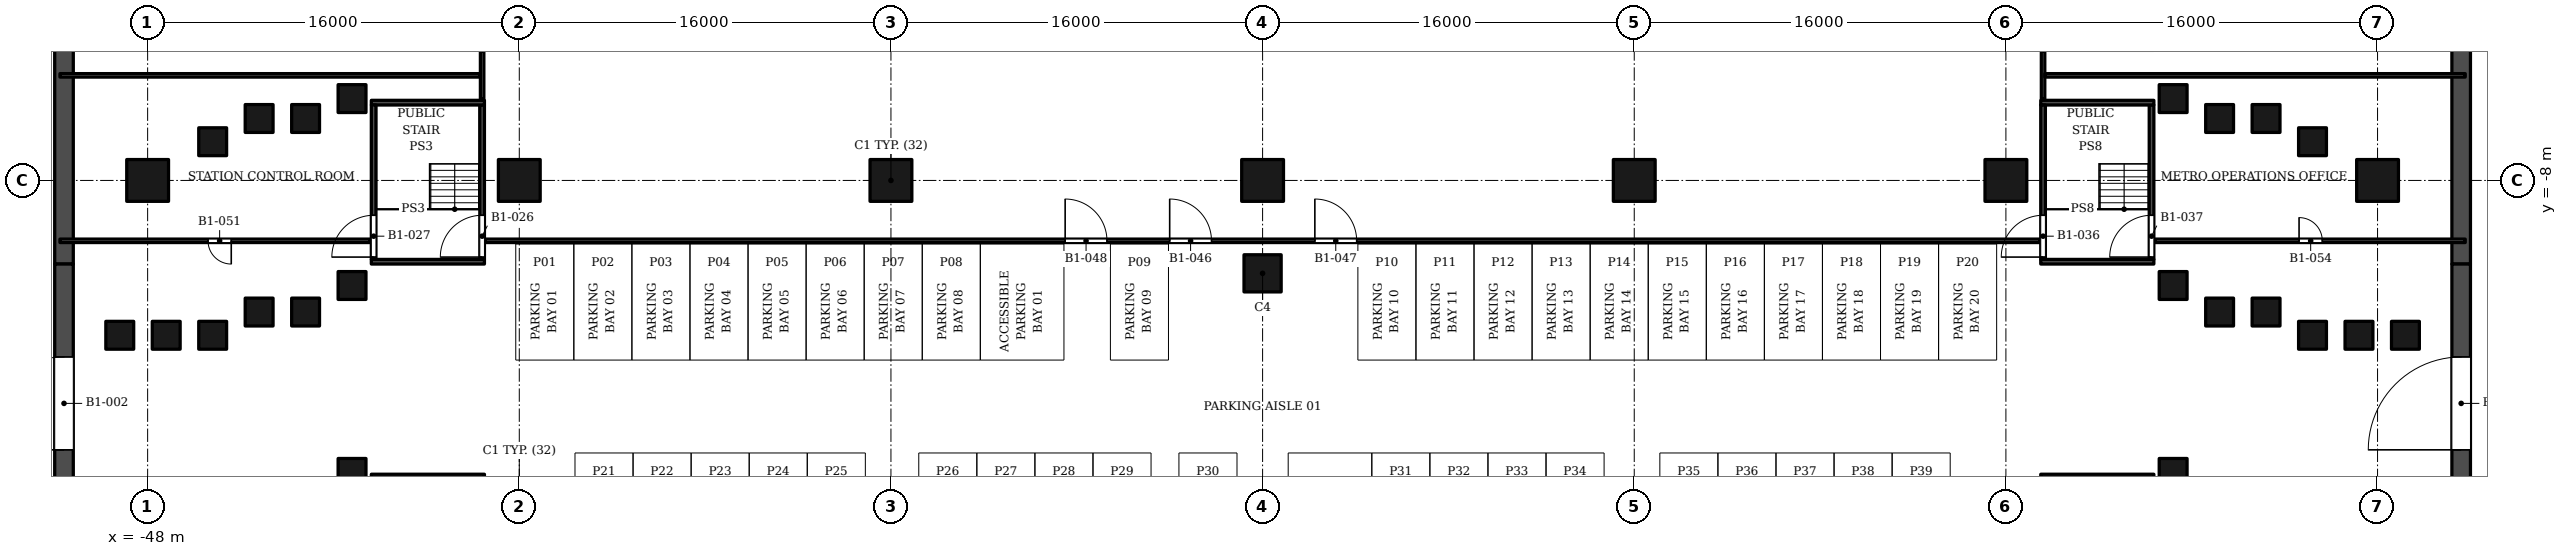
"""IFC4 building model, lengths in metres.
Left out: names, types, materials, properties, quantities, classifications, styles, units other than length and angle.
Written with IfcOpenShell. Run it as: python <this file> out.ifc"""

import sys

from ifc_helpers import new_model, si_unit, direction, frame, frame_2d, origin, origin_2d, place, context, subcontext, project, spatial, rectangle, extrude, element, fill, save


model = new_model("IFC4")
c1 = context("Model", 3, precision=1e-05, world=origin(), true_north=direction((0.0, 1.0)))
c2 = subcontext(c1, "Body", "Model", "MODEL_VIEW")
j1 = project(units=[si_unit("LENGTHUNIT", "METRE"), si_unit("PLANEANGLEUNIT", "RADIAN")], contexts=[c1])
p1 = place(None, origin())
s1 = spatial("IfcSite", under=j1, at=p1, CompositionType="ELEMENT")
p2 = place(p1, origin())
s2 = spatial("IfcBuilding", under=s1, at=p2, CompositionType="ELEMENT")
p3 = place(p2, frame((0.0, 0.0, -5.0)))
s3 = spatial("IfcBuildingStorey", under=s2, at=p3, CompositionType="ELEMENT", Elevation=-5.0)
p4 = place(p3, frame((51.6, -23.6, 0.0), z_axis=(0.0, 0.0, 1.0), x_axis=(0.0, 1.0, 0.0)))
e1 = element("IfcWall", 1, at=p4, inside=s3, PredefinedType="SHEAR", context=c2, shape_type="SweptSolid", body=[
    extrude(rectangle(XDim=12.0, YDim=0.8, at=frame_2d((6.0, 0.0))), origin(), (0.0, 0.0, 1.0), 5.0),
])
p5 = place(p4, frame((4.0, 0.0, 0.0)))
e2 = element("IfcOpeningElement", 2, at=p5, cuts=e1, PredefinedType="OPENING", context=c2, shape_type="SweptSolid", body=[
    extrude(rectangle(XDim=4.0, YDim=2.5, at=frame_2d((2.0, 1.25))), frame((0.0, 0.41, 0.0), z_axis=(0.0, -1.0, 0.0), x_axis=(1.0, 0.0, 0.0)), (0.0, 0.0, 1.0), 0.82),
])
p6 = place(p3, frame((-51.6, -23.6, 0.0), z_axis=(0.0, 0.0, 1.0), x_axis=(0.0, 1.0, 0.0)))
e3 = element("IfcWall", 3, at=p6, inside=s3, PredefinedType="SHEAR", context=c2, shape_type="SweptSolid", body=[
    extrude(rectangle(XDim=12.0, YDim=0.8, at=frame_2d((6.0, 0.0))), origin(), (0.0, 0.0, 1.0), 5.0),
])
p7 = place(p6, frame((4.0, 0.0, 0.0)))
e4 = element("IfcOpeningElement", 4, at=p7, cuts=e3, PredefinedType="OPENING", context=c2, shape_type="SweptSolid", body=[
    extrude(rectangle(XDim=4.0, YDim=2.5, at=frame_2d((2.0, 1.25))), frame((0.0, 0.41, 0.0), z_axis=(0.0, -1.0, 0.0), x_axis=(1.0, 0.0, 0.0)), (0.0, 0.0, 1.0), 0.82),
])
for number, where, z_axis, x_axis in (
    (5, (51.6, -11.6, 0.0), (0.0, 0.0, 1.0), (0.0, 1.0, 0.0)),
    (6, (-51.6, 21.0, 0.0), (0.0, 0.0, 1.0), (0.0, -1.0, 0.0)),
):
    element("IfcWall", number, at=place(p3, frame(where, z_axis=z_axis, x_axis=x_axis)), inside=s3, PredefinedType="SHEAR", context=c2, shape_type="SweptSolid", body=[
        extrude(rectangle(XDim=32.6, YDim=0.8, at=frame_2d((16.3, 0.0))), origin(), (0.0, 0.0, 1.0), 5.0),
    ])
for number, where, z_axis, x_axis in (
    (7, (-48.0, -8.0, 0.0), (0.0, 0.0, 1.0), (1.0, 0.0, 0.0)),
    (8, (-32.0, -8.0, 0.0), (0.0, 0.0, 1.0), (1.0, 0.0, 0.0)),
    (9, (-16.0, -8.0, 0.0), (0.0, 0.0, 1.0), (1.0, 0.0, 0.0)),
    (10, (0.0, -8.0, 0.0), (0.0, 0.0, 1.0), (1.0, 0.0, 0.0)),
    (11, (16.0, -8.0, 0.0), (0.0, 0.0, 1.0), (1.0, 0.0, 0.0)),
    (12, (32.0, -8.0, 0.0), (0.0, 0.0, 1.0), (1.0, 0.0, 0.0)),
    (13, (48.0, -8.0, 0.0), (0.0, 0.0, 1.0), (1.0, 0.0, 0.0)),
):
    element("IfcColumn", number, at=place(p3, frame(where, z_axis=z_axis, x_axis=x_axis)), inside=s3, PredefinedType="COLUMN", context=c2, shape_type="SweptSolid", body=[
        extrude(rectangle(XDim=1.8, YDim=1.8, at=origin_2d()), origin(), (0.0, 0.0, 1.0), 5.0),
    ])
for number, where, z_axis, x_axis in (
    (14, (-39.2, -20.572, 0.0), (0.0, 0.0, 1.0), (1.0, 0.0, 0.0)),
    (15, (-39.2, -12.524, 0.0), (0.0, 0.0, 1.0), (1.0, 0.0, 0.0)),
    (16, (-39.2, -4.476, 0.0), (0.0, 0.0, 1.0), (1.0, 0.0, 0.0)),
    (17, (39.2, -4.476, 0.0), (0.0, 0.0, 1.0), (1.0, 0.0, 0.0)),
    (18, (39.2, -12.524, 0.0), (0.0, 0.0, 1.0), (1.0, 0.0, 0.0)),
    (19, (39.2, -20.572, 0.0), (0.0, 0.0, 1.0), (1.0, 0.0, 0.0)),
    (20, (-41.2, -13.667, 0.0), (0.0, 0.0, 1.0), (1.0, 0.0, 0.0)),
    (21, (-41.2, -5.333, 0.0), (0.0, 0.0, 1.0), (1.0, 0.0, 0.0)),
    (22, (41.2, -5.333, 0.0), (0.0, 0.0, 1.0), (1.0, 0.0, 0.0)),
    (23, (41.2, -13.667, 0.0), (0.0, 0.0, 1.0), (1.0, 0.0, 0.0)),
    (24, (-43.2, -13.667, 0.0), (0.0, 0.0, 1.0), (1.0, 0.0, 0.0)),
    (25, (-43.2, -5.333, 0.0), (0.0, 0.0, 1.0), (1.0, 0.0, 0.0)),
    (26, (43.2, -5.333, 0.0), (0.0, 0.0, 1.0), (1.0, 0.0, 0.0)),
    (27, (43.2, -13.667, 0.0), (0.0, 0.0, 1.0), (1.0, 0.0, 0.0)),
    (28, (-45.2, -14.667, 0.0), (0.0, 0.0, 1.0), (1.0, 0.0, 0.0)),
    (29, (-45.2, -6.333, 0.0), (0.0, 0.0, 1.0), (1.0, 0.0, 0.0)),
    (30, (45.2, -6.333, 0.0), (0.0, 0.0, 1.0), (1.0, 0.0, 0.0)),
    (31, (45.2, -14.667, 0.0), (0.0, 0.0, 1.0), (1.0, 0.0, 0.0)),
    (32, (-47.2, -14.667, 0.0), (0.0, 0.0, 1.0), (1.0, 0.0, 0.0)),
    (33, (47.2, -14.667, 0.0), (0.0, 0.0, 1.0), (1.0, 0.0, 0.0)),
    (34, (-49.2, -14.667, 0.0), (0.0, 0.0, 1.0), (1.0, 0.0, 0.0)),
    (35, (49.2, -14.667, 0.0), (0.0, 0.0, 1.0), (1.0, 0.0, 0.0)),
):
    element("IfcColumn", number, at=place(p3, frame(where, z_axis=z_axis, x_axis=x_axis)), inside=s3, PredefinedType="COLUMN", context=c2, shape_type="SweptSolid", body=[
        extrude(rectangle(XDim=1.2, YDim=1.2, at=origin_2d()), origin(), (0.0, 0.0, 1.0), 5.0),
    ])
p8 = place(p3, frame((0.0, -12.0, 0.0), z_axis=(0.0, 0.0, 1.0), x_axis=(1.0, 0.0, 0.0)))
e36 = element("IfcColumn", 36, at=p8, inside=s3, PredefinedType="COLUMN", context=c2, shape_type="SweptSolid", body=[
    extrude(rectangle(XDim=1.6, YDim=1.6, at=origin_2d()), origin(), (0.0, 0.0, 1.0), 5.0),
])
for number, where, z_axis, x_axis in (
    (37, (-38.37, -20.75, 0.0), (0.0, 0.0, 1.0), (1.0, 0.0, 0.0)),
    (38, (-38.37, -11.5, 0.0), (0.0, 0.0, 1.0), (1.0, 0.0, 0.0)),
    (39, (-38.37, -4.65, 0.0), (0.0, 0.0, 1.0), (1.0, 0.0, 0.0)),
):
    element("IfcWall", number, at=place(p3, frame(where, z_axis=z_axis, x_axis=x_axis)), inside=s3, PredefinedType="SOLIDWALL", context=c2, shape_type="SweptSolid", body=[
        extrude(rectangle(XDim=4.87, YDim=0.2, at=frame_2d((2.435, 0.0))), origin(), (0.0, 0.0, 1.0), 4.45),
    ])
p9 = place(p3, frame((-38.27, -11.4, 0.0), z_axis=(0.0, 0.0, 1.0), x_axis=(0.0, 1.0, 0.0)))
e40 = element("IfcWall", 40, at=p9, inside=s3, PredefinedType="SOLIDWALL", context=c2, shape_type="SweptSolid", body=[
    extrude(rectangle(XDim=6.65, YDim=0.2, at=frame_2d((3.325, 0.0))), origin(), (0.0, 0.0, 1.0), 4.45),
])
p10 = place(p9, frame((0.1, 0.0, 0.0)))
e41 = element("IfcOpeningElement", 41, at=p10, cuts=e40, PredefinedType="OPENING", context=c2, shape_type="SweptSolid", body=[
    extrude(rectangle(XDim=1.8, YDim=2.4, at=frame_2d((0.9, 1.2))), frame((0.0, 0.11, 0.0), z_axis=(0.0, -1.0, 0.0), x_axis=(1.0, 0.0, 0.0)), (0.0, 0.0, 1.0), 0.22),
])
p11 = place(p3, frame((-33.6, -11.4, 0.0), z_axis=(0.0, 0.0, 1.0), x_axis=(0.0, 1.0, 0.0)))
e42 = element("IfcWall", 42, at=p11, inside=s3, PredefinedType="SOLIDWALL", context=c2, shape_type="SweptSolid", body=[
    extrude(rectangle(XDim=6.65, YDim=0.2, at=frame_2d((3.325, 0.0))), origin(), (0.0, 0.0, 1.0), 4.45),
])
p12 = place(p11, frame((0.1, 0.0, 0.0)))
e43 = element("IfcOpeningElement", 43, at=p12, cuts=e42, PredefinedType="OPENING", context=c2, shape_type="SweptSolid", body=[
    extrude(rectangle(XDim=1.8, YDim=2.4, at=frame_2d((0.9, 1.2))), frame((0.0, 0.11, 0.0), z_axis=(0.0, -1.0, 0.0), x_axis=(1.0, 0.0, 0.0)), (0.0, 0.0, 1.0), 0.22),
])
for number, where, z_axis, x_axis in (
    (44, (33.5, -20.75, 0.0), (0.0, 0.0, 1.0), (1.0, 0.0, 0.0)),
    (45, (33.5, -11.5, 0.0), (0.0, 0.0, 1.0), (1.0, 0.0, 0.0)),
    (46, (33.5, -4.65, 0.0), (0.0, 0.0, 1.0), (1.0, 0.0, 0.0)),
):
    element("IfcWall", number, at=place(p3, frame(where, z_axis=z_axis, x_axis=x_axis)), inside=s3, PredefinedType="SOLIDWALL", context=c2, shape_type="SweptSolid", body=[
        extrude(rectangle(XDim=4.87, YDim=0.2, at=frame_2d((2.435, 0.0))), origin(), (0.0, 0.0, 1.0), 4.45),
    ])
p13 = place(p3, frame((33.6, -11.4, 0.0), z_axis=(0.0, 0.0, 1.0), x_axis=(0.0, 1.0, 0.0)))
e47 = element("IfcWall", 47, at=p13, inside=s3, PredefinedType="SOLIDWALL", context=c2, shape_type="SweptSolid", body=[
    extrude(rectangle(XDim=6.65, YDim=0.2, at=frame_2d((3.325, 0.0))), origin(), (0.0, 0.0, 1.0), 4.45),
])
p14 = place(p13, frame((0.1, 0.0, 0.0)))
e48 = element("IfcOpeningElement", 48, at=p14, cuts=e47, PredefinedType="OPENING", context=c2, shape_type="SweptSolid", body=[
    extrude(rectangle(XDim=1.8, YDim=2.4, at=frame_2d((0.9, 1.2))), frame((0.0, 0.11, 0.0), z_axis=(0.0, -1.0, 0.0), x_axis=(1.0, 0.0, 0.0)), (0.0, 0.0, 1.0), 0.22),
])
p15 = place(p3, frame((38.27, -11.4, 0.0), z_axis=(0.0, 0.0, 1.0), x_axis=(0.0, 1.0, 0.0)))
e49 = element("IfcWall", 49, at=p15, inside=s3, PredefinedType="SOLIDWALL", context=c2, shape_type="SweptSolid", body=[
    extrude(rectangle(XDim=6.65, YDim=0.2, at=frame_2d((3.325, 0.0))), origin(), (0.0, 0.0, 1.0), 4.45),
])
p16 = place(p15, frame((0.1, 0.0, 0.0)))
e50 = element("IfcOpeningElement", 50, at=p16, cuts=e49, PredefinedType="OPENING", context=c2, shape_type="SweptSolid", body=[
    extrude(rectangle(XDim=1.8, YDim=2.4, at=frame_2d((0.9, 1.2))), frame((0.0, 0.11, 0.0), z_axis=(0.0, -1.0, 0.0), x_axis=(1.0, 0.0, 0.0)), (0.0, 0.0, 1.0), 0.22),
])
p17 = place(p3, frame((-51.775, -10.6, 0.0), z_axis=(0.0, 0.0, 1.0), x_axis=(1.0, 0.0, 0.0)))
e51 = element("IfcWall", 51, at=p17, inside=s3, PredefinedType="PARTITIONING", context=c2, shape_type="SweptSolid", body=[
    extrude(rectangle(XDim=13.365, YDim=0.15, at=frame_2d((6.683, 0.0))), origin(), (0.0, 0.0, 1.0), 3.55),
])
p18 = place(p17, frame((6.375, 0.0, 0.0)))
e52 = element("IfcOpeningElement", 52, at=p18, cuts=e51, PredefinedType="OPENING", context=c2, shape_type="SweptSolid", body=[
    extrude(rectangle(XDim=1.0, YDim=2.1, at=frame_2d((0.5, 1.05))), frame((0.0, 0.085, 0.0), z_axis=(0.0, -1.0, 0.0), x_axis=(1.0, 0.0, 0.0)), (0.0, 0.0, 1.0), 0.17),
])
p19 = place(p3, frame((-33.46, -10.6, 0.0), z_axis=(0.0, 0.0, 1.0), x_axis=(1.0, 0.0, 0.0)))
e53 = element("IfcWall", 53, at=p19, inside=s3, PredefinedType="PARTITIONING", context=c2, shape_type="SweptSolid", body=[
    extrude(rectangle(XDim=66.92, YDim=0.15, at=frame_2d((33.46, 0.0))), origin(), (0.0, 0.0, 1.0), 3.25),
])
p20 = place(p19, frame((29.46, 0.0, 0.0)))
e54 = element("IfcOpeningElement", 54, at=p20, cuts=e53, PredefinedType="OPENING", context=c2, shape_type="SweptSolid", body=[
    extrude(rectangle(XDim=1.8, YDim=2.1, at=frame_2d((0.9, 1.05))), frame((0.0, 0.085, 0.0), z_axis=(0.0, -1.0, 0.0), x_axis=(1.0, 0.0, 0.0)), (0.0, 0.0, 1.0), 0.17),
])
p21 = place(p19, frame((35.71, 0.0, 0.0)))
e55 = element("IfcOpeningElement", 55, at=p21, cuts=e53, PredefinedType="OPENING", context=c2, shape_type="SweptSolid", body=[
    extrude(rectangle(XDim=1.8, YDim=2.1, at=frame_2d((0.9, 1.05))), frame((0.0, 0.085, 0.0), z_axis=(0.0, -1.0, 0.0), x_axis=(1.0, 0.0, 0.0)), (0.0, 0.0, 1.0), 0.17),
])
p22 = place(p19, frame((24.96, 0.0, 0.0)))
e56 = element("IfcOpeningElement", 56, at=p22, cuts=e53, PredefinedType="OPENING", context=c2, shape_type="SweptSolid", body=[
    extrude(rectangle(XDim=1.8, YDim=2.1, at=frame_2d((0.9, 1.05))), frame((0.0, 0.085, 0.0), z_axis=(0.0, -1.0, 0.0), x_axis=(1.0, 0.0, 0.0)), (0.0, 0.0, 1.0), 0.17),
])
p23 = place(p3, frame((38.41, -10.6, 0.0), z_axis=(0.0, 0.0, 1.0), x_axis=(1.0, 0.0, 0.0)))
e57 = element("IfcWall", 57, at=p23, inside=s3, PredefinedType="PARTITIONING", context=c2, shape_type="SweptSolid", body=[
    extrude(rectangle(XDim=13.365, YDim=0.15, at=frame_2d((6.683, 0.0))), origin(), (0.0, 0.0, 1.0), 3.55),
])
p24 = place(p23, frame((6.211, 0.0, 0.0)))
e58 = element("IfcOpeningElement", 58, at=p24, cuts=e57, PredefinedType="OPENING", context=c2, shape_type="SweptSolid", body=[
    extrude(rectangle(XDim=1.0, YDim=2.1, at=frame_2d((0.5, 1.05))), frame((0.0, 0.085, 0.0), z_axis=(0.0, -1.0, 0.0), x_axis=(1.0, 0.0, 0.0)), (0.0, 0.0, 1.0), 0.17),
])
for number, where, z_axis, x_axis in (
    (59, (-33.6, -4.51, 0.0), (0.0, 0.0, 1.0), (0.0, 1.0, 0.0)),
    (60, (33.6, -4.51, 0.0), (0.0, 0.0, 1.0), (0.0, 1.0, 0.0)),
):
    element("IfcWall", number, at=place(p3, frame(where, z_axis=z_axis, x_axis=x_axis)), inside=s3, PredefinedType="PARTITIONING", context=c2, shape_type="SweptSolid", body=[
        extrude(rectangle(XDim=2.07, YDim=0.15, at=frame_2d((1.035, 0.0))), origin(), (0.0, 0.0, 1.0), 4.45),
    ])
for number, where, z_axis, x_axis in (
    (61, (-51.775, -3.475, 0.0), (0.0, 0.0, 1.0), (1.0, 0.0, 0.0)),
    (62, (33.675, -3.475, 0.0), (0.0, 0.0, 1.0), (1.0, 0.0, 0.0)),
):
    element("IfcWall", number, at=place(p3, frame(where, z_axis=z_axis, x_axis=x_axis)), inside=s3, PredefinedType="PARTITIONING", context=c2, shape_type="SweptSolid", body=[
        extrude(rectangle(XDim=18.1, YDim=0.15, at=frame_2d((9.05, 0.0))), origin(), (0.0, 0.0, 1.0), 3.55),
    ])
p25 = place(p5, origin())
e63 = element("IfcDoor", 63, at=p25, inside=s3, OperationType="SINGLE_SWING_LEFT", PredefinedType="DOOR", context=c2, shape_type="SweptSolid", body=[
    extrude(rectangle(XDim=4.0, YDim=2.5, at=frame_2d((2.0, 1.25))), frame((0.0, 0.025, 0.0), z_axis=(0.0, -1.0, 0.0), x_axis=(1.0, 0.0, 0.0)), (0.0, 0.0, 1.0), 0.05),
])
fill(e2, e63)
p26 = place(p7, origin())
e64 = element("IfcDoor", 64, at=p26, inside=s3, OperationType="SINGLE_SWING_LEFT", PredefinedType="DOOR", context=c2, shape_type="SweptSolid", body=[
    extrude(rectangle(XDim=4.0, YDim=2.5, at=frame_2d((2.0, 1.25))), frame((0.0, 0.025, 0.0), z_axis=(0.0, -1.0, 0.0), x_axis=(1.0, 0.0, 0.0)), (0.0, 0.0, 1.0), 0.05),
])
fill(e4, e64)
p27 = place(p12, origin())
e65 = element("IfcDoor", 65, at=p27, inside=s3, OperationType="DOUBLE_DOOR_SINGLE_SWING", PredefinedType="DOOR", context=c2, shape_type="SweptSolid", body=[
    extrude(rectangle(XDim=1.8, YDim=2.4, at=frame_2d((0.9, 1.2))), frame((0.0, 0.025, 0.0), z_axis=(0.0, -1.0, 0.0), x_axis=(1.0, 0.0, 0.0)), (0.0, 0.0, 1.0), 0.05),
])
fill(e43, e65)
p28 = place(p10, origin())
e66 = element("IfcDoor", 66, at=p28, inside=s3, OperationType="DOUBLE_DOOR_SINGLE_SWING", PredefinedType="DOOR", context=c2, shape_type="SweptSolid", body=[
    extrude(rectangle(XDim=1.8, YDim=2.4, at=frame_2d((0.9, 1.2))), frame((0.0, 0.025, 0.0), z_axis=(0.0, -1.0, 0.0), x_axis=(1.0, 0.0, 0.0)), (0.0, 0.0, 1.0), 0.05),
])
fill(e41, e66)
p29 = place(p14, origin())
e67 = element("IfcDoor", 67, at=p29, inside=s3, OperationType="DOUBLE_DOOR_SINGLE_SWING", PredefinedType="DOOR", context=c2, shape_type="SweptSolid", body=[
    extrude(rectangle(XDim=1.8, YDim=2.4, at=frame_2d((0.9, 1.2))), frame((0.0, 0.025, 0.0), z_axis=(0.0, -1.0, 0.0), x_axis=(1.0, 0.0, 0.0)), (0.0, 0.0, 1.0), 0.05),
])
fill(e48, e67)
p30 = place(p16, origin())
e68 = element("IfcDoor", 68, at=p30, inside=s3, OperationType="DOUBLE_DOOR_SINGLE_SWING", PredefinedType="DOOR", context=c2, shape_type="SweptSolid", body=[
    extrude(rectangle(XDim=1.8, YDim=2.4, at=frame_2d((0.9, 1.2))), frame((0.0, 0.025, 0.0), z_axis=(0.0, -1.0, 0.0), x_axis=(1.0, 0.0, 0.0)), (0.0, 0.0, 1.0), 0.05),
])
fill(e50, e68)
p31 = place(p20, origin())
e69 = element("IfcDoor", 69, at=p31, inside=s3, OperationType="DOUBLE_DOOR_SINGLE_SWING", PredefinedType="DOOR", context=c2, shape_type="SweptSolid", body=[
    extrude(rectangle(XDim=1.8, YDim=2.1, at=frame_2d((0.9, 1.05))), frame((0.0, 0.025, 0.0), z_axis=(0.0, -1.0, 0.0), x_axis=(1.0, 0.0, 0.0)), (0.0, 0.0, 1.0), 0.05),
])
fill(e54, e69)
p32 = place(p21, origin())
e70 = element("IfcDoor", 70, at=p32, inside=s3, OperationType="DOUBLE_DOOR_SINGLE_SWING", PredefinedType="DOOR", context=c2, shape_type="SweptSolid", body=[
    extrude(rectangle(XDim=1.8, YDim=2.1, at=frame_2d((0.9, 1.05))), frame((0.0, 0.025, 0.0), z_axis=(0.0, -1.0, 0.0), x_axis=(1.0, 0.0, 0.0)), (0.0, 0.0, 1.0), 0.05),
])
fill(e55, e70)
p33 = place(p22, origin())
e71 = element("IfcDoor", 71, at=p33, inside=s3, OperationType="DOUBLE_DOOR_SINGLE_SWING", PredefinedType="DOOR", context=c2, shape_type="SweptSolid", body=[
    extrude(rectangle(XDim=1.8, YDim=2.1, at=frame_2d((0.9, 1.05))), frame((0.0, 0.025, 0.0), z_axis=(0.0, -1.0, 0.0), x_axis=(1.0, 0.0, 0.0)), (0.0, 0.0, 1.0), 0.05),
])
fill(e56, e71)
p34 = place(p18, origin())
e72 = element("IfcDoor", 72, at=p34, inside=s3, OperationType="SINGLE_SWING_RIGHT", PredefinedType="DOOR", context=c2, shape_type="SweptSolid", body=[
    extrude(rectangle(XDim=1.0, YDim=2.1, at=frame_2d((0.5, 1.05))), frame((0.0, 0.025, 0.0), z_axis=(0.0, -1.0, 0.0), x_axis=(1.0, 0.0, 0.0)), (0.0, 0.0, 1.0), 0.05),
])
fill(e52, e72)
p35 = place(p24, origin())
e73 = element("IfcDoor", 73, at=p35, inside=s3, OperationType="SINGLE_SWING_LEFT", PredefinedType="DOOR", context=c2, shape_type="SweptSolid", body=[
    extrude(rectangle(XDim=1.0, YDim=2.1, at=frame_2d((0.5, 1.05))), frame((0.0, 0.025, 0.0), z_axis=(0.0, -1.0, 0.0), x_axis=(1.0, 0.0, 0.0)), (0.0, 0.0, 1.0), 0.05),
])
fill(e58, e73)
save(model, sys.argv[1])
